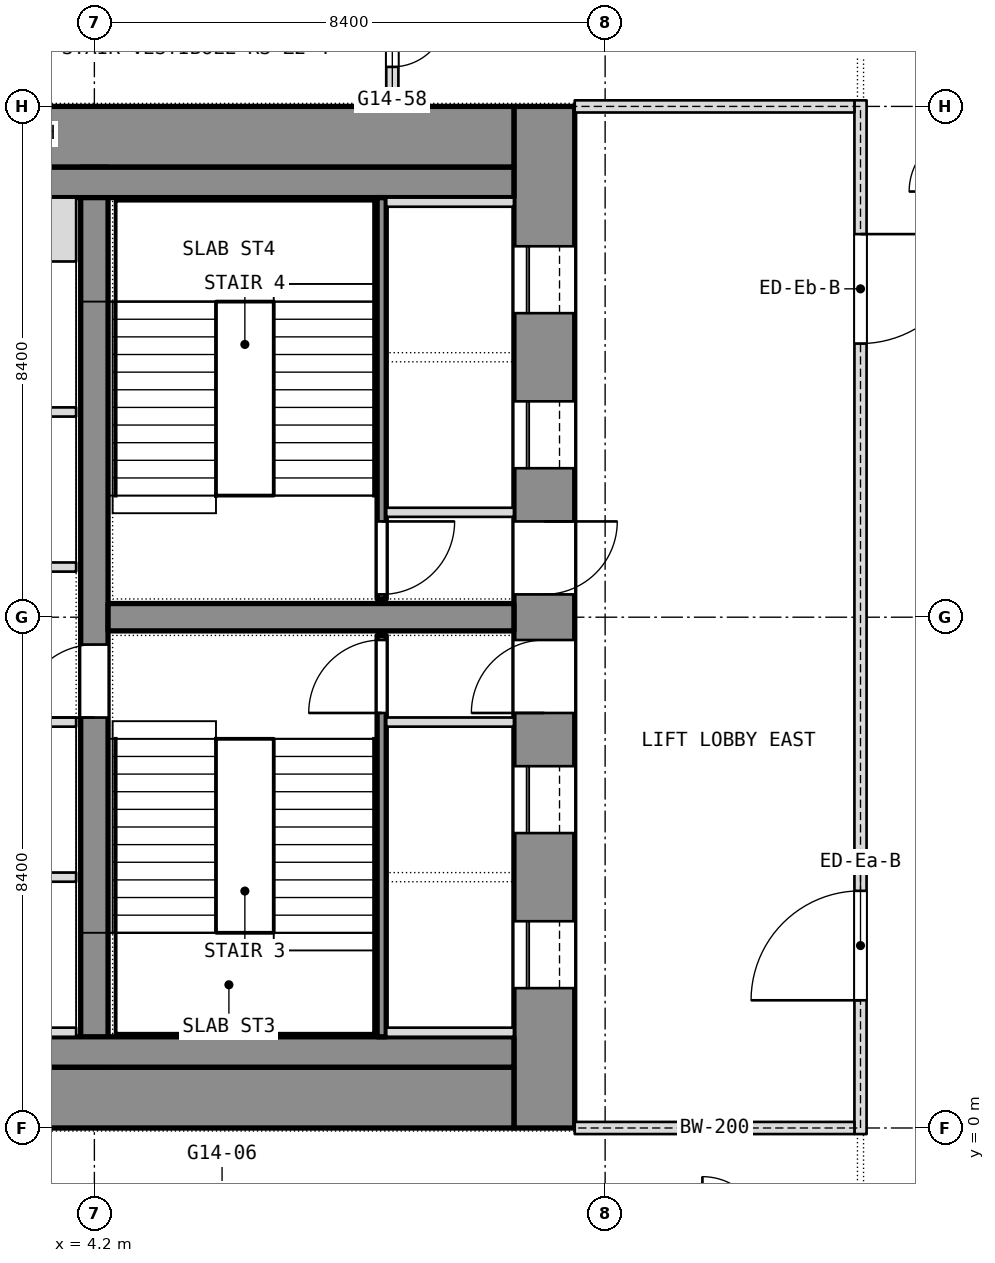
"""IFC4 building model, lengths in metres.
Left out: names, types, materials, properties, quantities, classifications, styles, units other than length and angle.
Written with IfcOpenShell. Run it as: python <this file> out.ifc"""

import sys

from ifc_helpers import new_model, si_unit, direction, frame, frame_2d, origin, place, context, subcontext, project, spatial, rectangle, extrude, element, fill, save


model = new_model("IFC4")
c1 = context("Model", 3, precision=1e-05, world=origin(), true_north=direction((0.0, 1.0)))
c2 = subcontext(c1, "Body", "Model", "MODEL_VIEW")
j1 = project(units=[si_unit("LENGTHUNIT", "METRE"), si_unit("PLANEANGLEUNIT", "RADIAN")], contexts=[c1])
p1 = place(None, origin())
s1 = spatial("IfcSite", under=j1, at=p1, CompositionType="ELEMENT")
p2 = place(p1, origin())
s2 = spatial("IfcBuilding", under=s1, at=p2, CompositionType="ELEMENT")
p3 = place(p2, frame((0.0, 0.0, 158.9)))
s3 = spatial("IfcBuildingStorey", under=s2, at=p3, CompositionType="ELEMENT", Elevation=158.9)
p4 = place(p3, frame((11.6, 0.0, 0.0), z_axis=(0.0, 0.0, 1.0), x_axis=(0.0, 1.0, 0.0)))
e1 = element("IfcWall", 1, at=p4, inside=s3, PredefinedType="SHEAR", context=c2, shape_type="SweptSolid", body=[
    extrude(rectangle(XDim=16.8, YDim=1.0, at=frame_2d((8.4, 0.0))), origin(), (0.0, 0.0, 1.0), 3.6),
])
p5 = place(p4, frame((2.3, 0.0, 0.0)))
e2 = element("IfcOpeningElement", 2, at=p5, cuts=e1, PredefinedType="OPENING", context=c2, shape_type="SweptSolid", body=[
    extrude(rectangle(XDim=1.1, YDim=2.1, at=frame_2d((0.55, 1.05))), frame((0.0, 0.5, 0.0), z_axis=(0.0, -1.0, 0.0), x_axis=(1.0, 0.0, 0.0)), (0.0, 0.0, 1.0), 1.0),
])
p6 = place(p4, frame((4.85, 0.0, 0.0)))
e3 = element("IfcOpeningElement", 3, at=p6, cuts=e1, PredefinedType="OPENING", context=c2, shape_type="SweptSolid", body=[
    extrude(rectangle(XDim=1.1, YDim=2.1, at=frame_2d((0.55, 1.05))), frame((0.0, 0.5, 0.0), z_axis=(0.0, -1.0, 0.0), x_axis=(1.0, 0.0, 0.0)), (0.0, 0.0, 1.0), 1.0),
])
p7 = place(p4, frame((6.825, 0.0, 0.0)))
e4 = element("IfcOpeningElement", 4, at=p7, cuts=e1, PredefinedType="OPENING", context=c2, shape_type="SweptSolid", body=[
    extrude(rectangle(XDim=1.2, YDim=2.1, at=frame_2d((0.6, 1.05))), frame((0.0, 0.5, 0.0), z_axis=(0.0, -1.0, 0.0), x_axis=(1.0, 0.0, 0.0)), (0.0, 0.0, 1.0), 1.0),
])
p8 = place(p4, frame((13.4, 0.0, 0.0)))
e5 = element("IfcOpeningElement", 5, at=p8, cuts=e1, PredefinedType="OPENING", context=c2, shape_type="SweptSolid", body=[
    extrude(rectangle(XDim=1.1, YDim=2.1, at=frame_2d((0.55, 1.05))), frame((0.0, 0.5, 0.0), z_axis=(0.0, -1.0, 0.0), x_axis=(1.0, 0.0, 0.0)), (0.0, 0.0, 1.0), 1.0),
])
p9 = place(p4, frame((10.85, 0.0, 0.0)))
e6 = element("IfcOpeningElement", 6, at=p9, cuts=e1, PredefinedType="OPENING", context=c2, shape_type="SweptSolid", body=[
    extrude(rectangle(XDim=1.1, YDim=2.1, at=frame_2d((0.55, 1.05))), frame((0.0, 0.5, 0.0), z_axis=(0.0, -1.0, 0.0), x_axis=(1.0, 0.0, 0.0)), (0.0, 0.0, 1.0), 1.0),
])
p10 = place(p4, frame((8.775, 0.0, 0.0)))
e7 = element("IfcOpeningElement", 7, at=p10, cuts=e1, PredefinedType="OPENING", context=c2, shape_type="SweptSolid", body=[
    extrude(rectangle(XDim=1.2, YDim=2.1, at=frame_2d((0.6, 1.05))), frame((0.0, 0.5, 0.0), z_axis=(0.0, -1.0, 0.0), x_axis=(1.0, 0.0, 0.0)), (0.0, 0.0, 1.0), 1.0),
])
for number, where, z_axis, x_axis in (
    (8, (-11.1, 0.5, 0.0), (0.0, 0.0, 1.0), (1.0, 0.0, 0.0)),
    (9, (-11.1, 16.3, 0.0), (0.0, 0.0, 1.0), (1.0, 0.0, 0.0)),
):
    element("IfcWall", number, at=place(p3, frame(where, z_axis=z_axis, x_axis=x_axis)), inside=s3, PredefinedType="SHEAR", context=c2, shape_type="SweptSolid", body=[
        extrude(rectangle(XDim=22.2, YDim=1.0, at=frame_2d((11.1, 0.0))), origin(), (0.0, 0.0, 1.0), 3.6),
    ])
p11 = place(p3, frame((4.2, 1.0, 0.0), z_axis=(0.0, 0.0, 1.0), x_axis=(0.0, 1.0, 0.0)))
e10 = element("IfcWall", 10, at=p11, inside=s3, PredefinedType="SHEAR", context=c2, shape_type="SweptSolid", body=[
    extrude(rectangle(XDim=14.8, YDim=0.45, at=frame_2d((7.4, 0.0))), origin(), (0.0, 0.0, 1.0), 3.6),
])
p12 = place(p11, frame((5.75, 0.0, 0.0)))
e11 = element("IfcOpeningElement", 11, at=p12, cuts=e10, PredefinedType="OPENING", context=c2, shape_type="SweptSolid", body=[
    extrude(rectangle(XDim=1.2, YDim=2.1, at=frame_2d((0.6, 1.05))), frame((0.0, 0.225, 0.0), z_axis=(0.0, -1.0, 0.0), x_axis=(1.0, 0.0, 0.0)), (0.0, 0.0, 1.0), 0.45),
])
p13 = place(p3, frame((4.425, 8.4, 0.0), z_axis=(0.0, 0.0, 1.0), x_axis=(1.0, 0.0, 0.0)))
e12 = element("IfcWall", 12, at=p13, inside=s3, PredefinedType="SHEAR", context=c2, shape_type="SweptSolid", body=[
    extrude(rectangle(XDim=6.675, YDim=0.45, at=frame_2d((3.337, 0.0))), origin(), (0.0, 0.0, 1.0), 3.6),
])
p14 = place(p3, frame((9.1, 16.9, 0.0), z_axis=(0.0, 0.0, 1.0), x_axis=(0.0, 1.0, 0.0)))
e13 = element("IfcWall", 13, at=p14, inside=s3, PredefinedType="PARTITIONING", context=c2, shape_type="SweptSolid", body=[
    extrude(rectangle(XDim=1.8, YDim=0.2, at=frame_2d((0.9, 0.0))), origin(), (0.0, 0.0, 1.0), 3.34),
])
p15 = place(p14, frame((0.55, 0.0, 0.0)))
e14 = element("IfcOpeningElement", 14, at=p15, cuts=e13, PredefinedType="OPENING", context=c2, shape_type="SweptSolid", body=[
    extrude(rectangle(XDim=0.9, YDim=2.1, at=frame_2d((0.45, 1.05))), frame((0.0, 0.1, 0.0), z_axis=(0.0, -1.0, 0.0), x_axis=(1.0, 0.0, 0.0)), (0.0, 0.0, 1.0), 0.2),
])
for number, where, z_axis, x_axis in (
    (15, (-11.1, 1.25, 0.0), (0.0, 0.0, 1.0), (1.0, 0.0, 0.0)),
    (16, (-11.1, 15.55, 0.0), (0.0, 0.0, 1.0), (1.0, 0.0, 0.0)),
):
    element("IfcWall", number, at=place(p3, frame(where, z_axis=z_axis, x_axis=x_axis)), inside=s3, PredefinedType="PARTITIONING", context=c2, shape_type="SweptSolid", body=[
        extrude(rectangle(XDim=22.2, YDim=0.5, at=frame_2d((11.1, 0.0))), origin(), (0.0, 0.0, 1.0), 3.34),
    ])
p16 = place(p3, frame((8.925, 1.5, 0.0), z_axis=(0.0, 0.0, 1.0), x_axis=(0.0, 1.0, 0.0)))
e17 = element("IfcWall", 17, at=p16, inside=s3, PredefinedType="SHEAR", context=c2, shape_type="SweptSolid", body=[
    extrude(rectangle(XDim=6.6, YDim=0.15, at=frame_2d((3.3, 0.0))), origin(), (0.0, 0.0, 1.0), 3.34),
])
p17 = place(p16, frame((5.325, 0.0, 0.0)))
e18 = element("IfcOpeningElement", 18, at=p17, cuts=e17, PredefinedType="OPENING", context=c2, shape_type="SweptSolid", body=[
    extrude(rectangle(XDim=1.2, YDim=2.1, at=frame_2d((0.6, 1.05))), frame((0.0, 0.075, 0.0), z_axis=(0.0, -1.0, 0.0), x_axis=(1.0, 0.0, 0.0)), (0.0, 0.0, 1.0), 0.15),
])
for number, where, z_axis, x_axis in (
    (19, (9.0, 6.675, 0.0), (0.0, 0.0, 1.0), (1.0, 0.0, 0.0)),
    (20, (9.0, 1.575, 0.0), (0.0, 0.0, 1.0), (1.0, 0.0, 0.0)),
):
    element("IfcWall", number, at=place(p3, frame(where, z_axis=z_axis, x_axis=x_axis)), inside=s3, PredefinedType="SHEAR", context=c2, shape_type="SweptSolid", body=[
        extrude(rectangle(XDim=2.1, YDim=0.15, at=frame_2d((1.05, 0.0))), origin(), (0.0, 0.0, 1.0), 3.6),
    ])
p18 = place(p3, frame((8.925, 8.7, 0.0), z_axis=(0.0, 0.0, 1.0), x_axis=(0.0, 1.0, 0.0)))
e21 = element("IfcWall", 21, at=p18, inside=s3, PredefinedType="SHEAR", context=c2, shape_type="SweptSolid", body=[
    extrude(rectangle(XDim=6.6, YDim=0.15, at=frame_2d((3.3, 0.0))), origin(), (0.0, 0.0, 1.0), 3.34),
])
p19 = place(p18, frame((0.075, 0.0, 0.0)))
e22 = element("IfcOpeningElement", 22, at=p19, cuts=e21, PredefinedType="OPENING", context=c2, shape_type="SweptSolid", body=[
    extrude(rectangle(XDim=1.2, YDim=2.1, at=frame_2d((0.6, 1.05))), frame((0.0, 0.075, 0.0), z_axis=(0.0, -1.0, 0.0), x_axis=(1.0, 0.0, 0.0)), (0.0, 0.0, 1.0), 0.15),
])
for number, where, z_axis, x_axis in (
    (23, (9.0, 10.125, 0.0), (0.0, 0.0, 1.0), (1.0, 0.0, 0.0)),
    (24, (9.0, 15.225, 0.0), (0.0, 0.0, 1.0), (1.0, 0.0, 0.0)),
):
    element("IfcWall", number, at=place(p3, frame(where, z_axis=z_axis, x_axis=x_axis)), inside=s3, PredefinedType="SHEAR", context=c2, shape_type="SweptSolid", body=[
        extrude(rectangle(XDim=2.1, YDim=0.15, at=frame_2d((1.05, 0.0))), origin(), (0.0, 0.0, 1.0), 3.6),
    ])
p20 = place(p3, frame((-3.9, 4.125, 0.0), z_axis=(0.0, 0.0, 1.0), x_axis=(1.0, 0.0, 0.0)))
e25 = element("IfcWall", 25, at=p20, inside=s3, PredefinedType="PARTITIONING", context=c2, shape_type="SweptSolid", body=[
    extrude(rectangle(XDim=7.8, YDim=0.15, at=frame_2d((3.9, 0.0))), origin(), (0.0, 0.0, 1.0), 3.34),
])
p21 = place(p20, frame((3.75, 0.0, 0.0)))
e26 = element("IfcOpeningElement", 26, at=p21, cuts=e25, PredefinedType="OPENING", context=c2, shape_type="SweptSolid", body=[
    extrude(rectangle(XDim=1.2, YDim=2.1, at=frame_2d((0.6, 1.05))), frame((0.0, 0.075, 0.0), z_axis=(0.0, -1.0, 0.0), x_axis=(1.0, 0.0, 0.0)), (0.0, 0.0, 1.0), 0.15),
])
p22 = place(p3, frame((-3.9, 11.775, 0.0), z_axis=(0.0, 0.0, 1.0), x_axis=(1.0, 0.0, 0.0)))
e27 = element("IfcWall", 27, at=p22, inside=s3, PredefinedType="PARTITIONING", context=c2, shape_type="SweptSolid", body=[
    extrude(rectangle(XDim=7.8, YDim=0.15, at=frame_2d((3.9, 0.0))), origin(), (0.0, 0.0, 1.0), 3.34),
])
p23 = place(p22, frame((3.3, 0.0, 0.0)))
e28 = element("IfcOpeningElement", 28, at=p23, cuts=e27, PredefinedType="OPENING", context=c2, shape_type="SweptSolid", body=[
    extrude(rectangle(XDim=1.2, YDim=2.1, at=frame_2d((0.6, 1.05))), frame((0.0, 0.075, 0.0), z_axis=(0.0, -1.0, 0.0), x_axis=(1.0, 0.0, 0.0)), (0.0, 0.0, 1.0), 0.15),
])
p24 = place(p3, frame((1.65, 1.575, 0.0), z_axis=(0.0, 0.0, 1.0), x_axis=(1.0, 0.0, 0.0)))
e29 = element("IfcWall", 29, at=p24, inside=s3, PredefinedType="SHEAR", context=c2, shape_type="SweptSolid", body=[
    extrude(rectangle(XDim=2.25, YDim=0.15, at=frame_2d((1.125, 0.0))), origin(), (0.0, 0.0, 1.0), 3.6),
])
p25 = place(p3, frame((1.65, 14.775, 0.0), z_axis=(0.0, 0.0, 1.0), x_axis=(1.0, 0.0, 0.0)))
e30 = element("IfcWall", 30, at=p25, inside=s3, PredefinedType="SHEAR", context=c2, shape_type="SweptSolid", body=[
    extrude(rectangle(XDim=2.25, YDim=1.05, at=frame_2d((1.125, 0.0))), origin(), (0.0, 0.0, 1.0), 3.6),
])
for number, where, z_axis, x_axis in (
    (31, (1.65, 6.675, 0.0), (0.0, 0.0, 1.0), (1.0, 0.0, 0.0)),
    (32, (1.65, 9.225, 0.0), (0.0, 0.0, 1.0), (1.0, 0.0, 0.0)),
):
    element("IfcWall", number, at=place(p3, frame(where, z_axis=z_axis, x_axis=x_axis)), inside=s3, PredefinedType="SHEAR", context=c2, shape_type="SweptSolid", body=[
        extrude(rectangle(XDim=2.25, YDim=0.15, at=frame_2d((1.125, 0.0))), origin(), (0.0, 0.0, 1.0), 3.6),
    ])
p26 = place(p3, frame((16.8, -0.1, 0.0), z_axis=(0.0, 0.0, 1.0), x_axis=(0.0, 1.0, 0.0)))
e33 = element("IfcWall", 33, at=p26, inside=s3, PredefinedType="PARTITIONING", context=c2, shape_type="SweptSolid", body=[
    extrude(rectangle(XDim=17.0, YDim=0.2, at=frame_2d((8.5, 0.0))), origin(), (0.0, 0.0, 1.0), 3.34),
])
p27 = place(p26, frame((2.2, 0.0, 0.0)))
e34 = element("IfcOpeningElement", 34, at=p27, cuts=e33, PredefinedType="OPENING", context=c2, shape_type="SweptSolid", body=[
    extrude(rectangle(XDim=1.8, YDim=2.1, at=frame_2d((0.9, 1.05))), frame((0.0, 0.1, 0.0), z_axis=(0.0, -1.0, 0.0), x_axis=(1.0, 0.0, 0.0)), (0.0, 0.0, 1.0), 0.2),
])
p28 = place(p26, frame((13.0, 0.0, 0.0)))
e35 = element("IfcOpeningElement", 35, at=p28, cuts=e33, PredefinedType="OPENING", context=c2, shape_type="SweptSolid", body=[
    extrude(rectangle(XDim=1.8, YDim=2.1, at=frame_2d((0.9, 1.05))), frame((0.0, 0.1, 0.0), z_axis=(0.0, -1.0, 0.0), x_axis=(1.0, 0.0, 0.0)), (0.0, 0.0, 1.0), 0.2),
])
for number, where, z_axis, x_axis in (
    (36, (12.1, 0.0, 0.0), (0.0, 0.0, 1.0), (1.0, 0.0, 0.0)),
    (37, (12.1, 16.8, 0.0), (0.0, 0.0, 1.0), (1.0, 0.0, 0.0)),
):
    element("IfcWall", number, at=place(p3, frame(where, z_axis=z_axis, x_axis=x_axis)), inside=s3, PredefinedType="PARTITIONING", context=c2, shape_type="SweptSolid", body=[
        extrude(rectangle(XDim=4.6, YDim=0.2, at=frame_2d((2.3, 0.0))), origin(), (0.0, 0.0, 1.0), 2.89),
    ])
p29 = place(p15, origin())
e38 = element("IfcDoor", 38, at=p29, inside=s3, OperationType="SINGLE_SWING_RIGHT", PredefinedType="DOOR", context=c2, shape_type="SweptSolid", body=[
    extrude(rectangle(XDim=0.9, YDim=2.1, at=frame_2d((0.45, 1.05))), frame((0.0, 0.025, 0.0), z_axis=(0.0, -1.0, 0.0), x_axis=(1.0, 0.0, 0.0)), (0.0, 0.0, 1.0), 0.05),
])
fill(e14, e38)
p30 = place(p5, origin())
e39 = element("IfcDoor", 39, at=p30, inside=s3, OperationType="SLIDING_TO_LEFT", PredefinedType="DOOR", context=c2, shape_type="SweptSolid", body=[
    extrude(rectangle(XDim=1.1, YDim=2.1, at=frame_2d((0.55, 1.05))), frame((0.0, 0.025, 0.0), z_axis=(0.0, -1.0, 0.0), x_axis=(1.0, 0.0, 0.0)), (0.0, 0.0, 1.0), 0.05),
])
fill(e2, e39)
p31 = place(p6, origin())
e40 = element("IfcDoor", 40, at=p31, inside=s3, OperationType="SLIDING_TO_LEFT", PredefinedType="DOOR", context=c2, shape_type="SweptSolid", body=[
    extrude(rectangle(XDim=1.1, YDim=2.1, at=frame_2d((0.55, 1.05))), frame((0.0, 0.025, 0.0), z_axis=(0.0, -1.0, 0.0), x_axis=(1.0, 0.0, 0.0)), (0.0, 0.0, 1.0), 0.05),
])
fill(e3, e40)
p32 = place(p7, origin())
e41 = element("IfcDoor", 41, at=p32, inside=s3, OperationType="SINGLE_SWING_LEFT", PredefinedType="DOOR", context=c2, shape_type="SweptSolid", body=[
    extrude(rectangle(XDim=1.2, YDim=2.1, at=frame_2d((0.6, 1.05))), frame((0.0, 0.025, 0.0), z_axis=(0.0, -1.0, 0.0), x_axis=(1.0, 0.0, 0.0)), (0.0, 0.0, 1.0), 0.05),
])
fill(e4, e41)
p33 = place(p17, origin())
e42 = element("IfcDoor", 42, at=p33, inside=s3, OperationType="SINGLE_SWING_LEFT", PredefinedType="DOOR", context=c2, shape_type="SweptSolid", body=[
    extrude(rectangle(XDim=1.2, YDim=2.1, at=frame_2d((0.6, 1.05))), frame((0.0, 0.025, 0.0), z_axis=(0.0, -1.0, 0.0), x_axis=(1.0, 0.0, 0.0)), (0.0, 0.0, 1.0), 0.05),
])
fill(e18, e42)
p34 = place(p8, origin())
e43 = element("IfcDoor", 43, at=p34, inside=s3, OperationType="SLIDING_TO_LEFT", PredefinedType="DOOR", context=c2, shape_type="SweptSolid", body=[
    extrude(rectangle(XDim=1.1, YDim=2.1, at=frame_2d((0.55, 1.05))), frame((0.0, 0.025, 0.0), z_axis=(0.0, -1.0, 0.0), x_axis=(1.0, 0.0, 0.0)), (0.0, 0.0, 1.0), 0.05),
])
fill(e5, e43)
p35 = place(p9, origin())
e44 = element("IfcDoor", 44, at=p35, inside=s3, OperationType="SLIDING_TO_LEFT", PredefinedType="DOOR", context=c2, shape_type="SweptSolid", body=[
    extrude(rectangle(XDim=1.1, YDim=2.1, at=frame_2d((0.55, 1.05))), frame((0.0, 0.025, 0.0), z_axis=(0.0, -1.0, 0.0), x_axis=(1.0, 0.0, 0.0)), (0.0, 0.0, 1.0), 0.05),
])
fill(e6, e44)
p36 = place(p10, origin())
e45 = element("IfcDoor", 45, at=p36, inside=s3, OperationType="SINGLE_SWING_LEFT", PredefinedType="DOOR", context=c2, shape_type="SweptSolid", body=[
    extrude(rectangle(XDim=1.2, YDim=2.1, at=frame_2d((0.6, 1.05))), frame((0.0, 0.025, 0.0), z_axis=(0.0, -1.0, 0.0), x_axis=(1.0, 0.0, 0.0)), (0.0, 0.0, 1.0), 0.05),
])
fill(e7, e45)
p37 = place(p19, origin())
e46 = element("IfcDoor", 46, at=p37, inside=s3, OperationType="SINGLE_SWING_LEFT", PredefinedType="DOOR", context=c2, shape_type="SweptSolid", body=[
    extrude(rectangle(XDim=1.2, YDim=2.1, at=frame_2d((0.6, 1.05))), frame((0.0, 0.025, 0.0), z_axis=(0.0, -1.0, 0.0), x_axis=(1.0, 0.0, 0.0)), (0.0, 0.0, 1.0), 0.05),
])
fill(e22, e46)
p38 = place(p12, origin())
e47 = element("IfcDoor", 47, at=p38, inside=s3, OperationType="SINGLE_SWING_LEFT", PredefinedType="DOOR", context=c2, shape_type="SweptSolid", body=[
    extrude(rectangle(XDim=1.2, YDim=2.1, at=frame_2d((0.6, 1.05))), frame((0.0, 0.025, 0.0), z_axis=(0.0, -1.0, 0.0), x_axis=(1.0, 0.0, 0.0)), (0.0, 0.0, 1.0), 0.05),
])
fill(e11, e47)
p39 = place(p27, origin())
e48 = element("IfcDoor", 48, at=p39, inside=s3, OperationType="DOUBLE_DOOR_SINGLE_SWING", PredefinedType="DOOR", context=c2, shape_type="SweptSolid", body=[
    extrude(rectangle(XDim=1.8, YDim=2.1, at=frame_2d((0.9, 1.05))), frame((0.0, 0.025, 0.0), z_axis=(0.0, -1.0, 0.0), x_axis=(1.0, 0.0, 0.0)), (0.0, 0.0, 1.0), 0.05),
])
fill(e34, e48)
p40 = place(p28, origin())
e49 = element("IfcDoor", 49, at=p40, inside=s3, OperationType="DOUBLE_DOOR_SINGLE_SWING", PredefinedType="DOOR", context=c2, shape_type="SweptSolid", body=[
    extrude(rectangle(XDim=1.8, YDim=2.1, at=frame_2d((0.9, 1.05))), frame((0.0, 0.025, 0.0), z_axis=(0.0, -1.0, 0.0), x_axis=(1.0, 0.0, 0.0)), (0.0, 0.0, 1.0), 0.05),
])
fill(e35, e49)
save(model, sys.argv[1])
